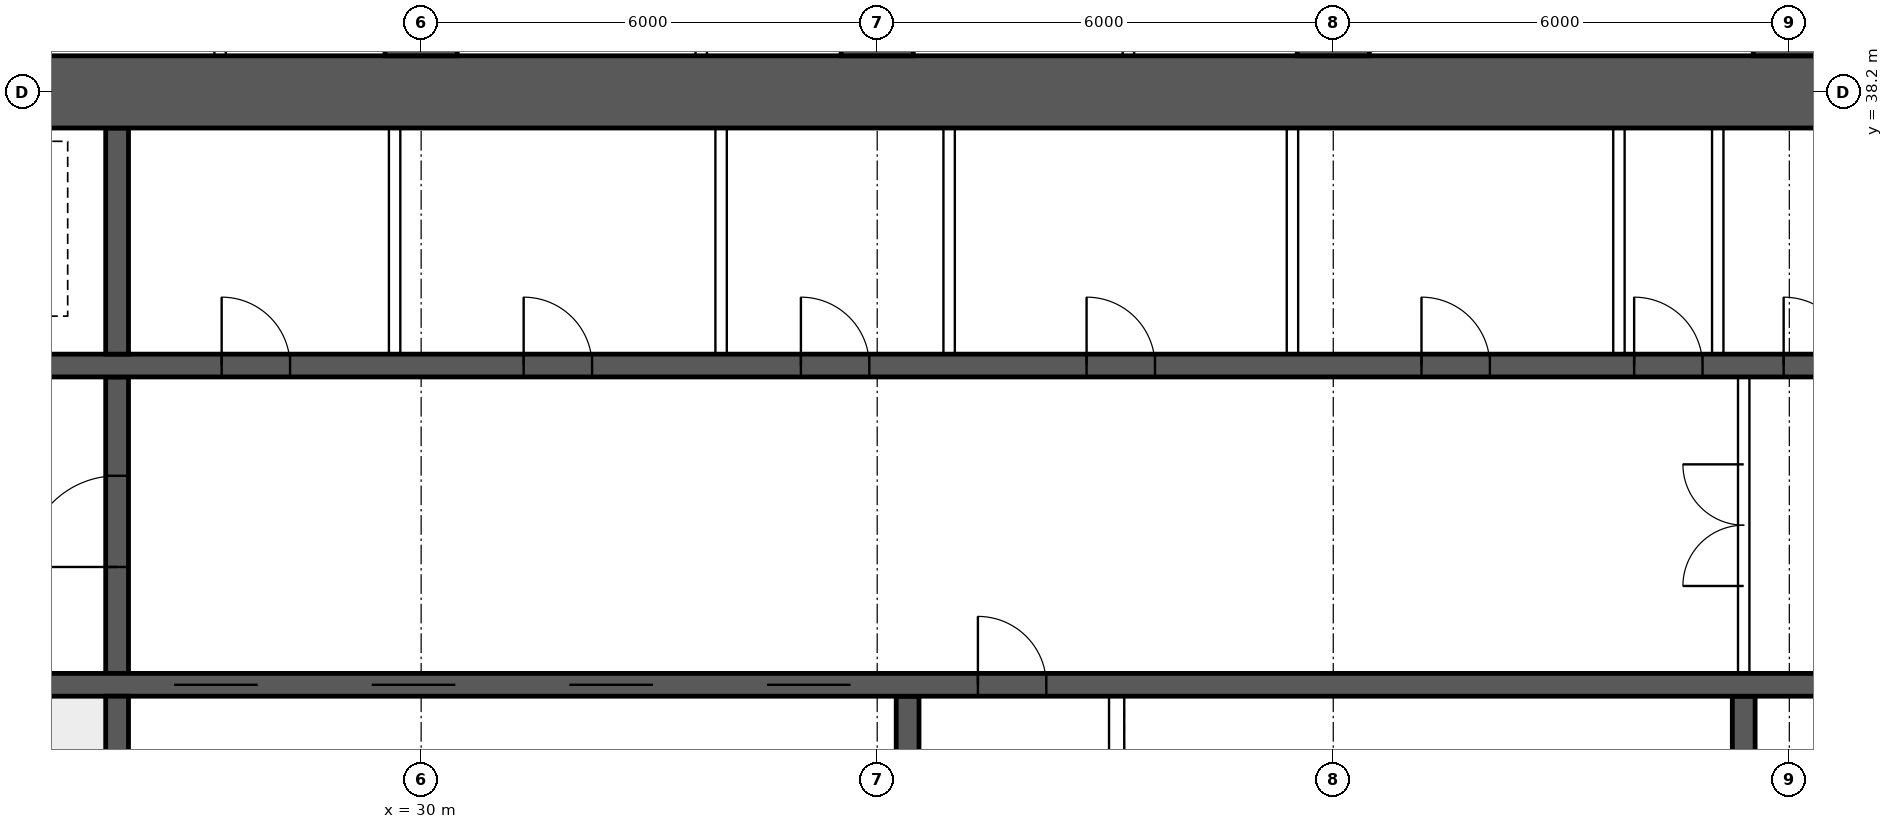
"""IFC4 building model, lengths in metres.
Left out: names, types, materials, properties, quantities, classifications, styles, units other than length and angle.
Written with IfcOpenShell. Run it as: python <this file> out.ifc"""

import sys

from ifc_helpers import new_model, si_unit, direction, frame, frame_2d, origin, place, context, subcontext, project, spatial, rectangle, extrude, element, fill, save


model = new_model("IFC4")
c1 = context("Model", 3, precision=1e-05, world=origin(), true_north=direction((0.0, 1.0)))
c2 = subcontext(c1, "Body", "Model", "MODEL_VIEW")
j1 = project(units=[si_unit("LENGTHUNIT", "METRE"), si_unit("PLANEANGLEUNIT", "RADIAN")], contexts=[c1])
p1 = place(None, origin())
s1 = spatial("IfcSite", under=j1, at=p1, CompositionType="ELEMENT")
p2 = place(p1, origin())
s2 = spatial("IfcBuilding", under=s1, at=p2, CompositionType="ELEMENT")
p3 = place(p2, frame((0.0, 0.0, 121.9)))
s3 = spatial("IfcBuildingStorey", under=s2, at=p3, CompositionType="ELEMENT", Elevation=121.9)
p4 = place(p3, frame((18.0, 38.2, 0.0), z_axis=(0.0, 0.0, 1.0), x_axis=(1.0, 0.0, 0.0)))
e1 = element("IfcWall", 1, at=p4, inside=s3, PredefinedType="SHEAR", context=c2, shape_type="SweptSolid", body=[
    extrude(rectangle(XDim=48.0, YDim=0.95, at=frame_2d((24.0, 0.0))), origin(), (0.0, 0.0, 1.0), 3.75),
])
p5 = place(p3, frame((18.475, 30.4, 0.0), z_axis=(0.0, 0.0, 1.0), x_axis=(1.0, 0.0, 0.0)))
e2 = element("IfcWall", 2, at=p5, inside=s3, PredefinedType="SHEAR", context=c2, shape_type="SweptSolid", body=[
    extrude(rectangle(XDim=47.05, YDim=0.3, at=frame_2d((23.525, 0.0))), origin(), (0.0, 0.0, 1.0), 3.75),
])
p6 = place(p5, frame((0.4, 0.0, 0.0)))
e3 = element("IfcOpeningElement", 3, at=p6, cuts=e2, PredefinedType="OPENING", context=c2, shape_type="SweptSolid", body=[
    extrude(rectangle(XDim=1.0, YDim=2.1, at=frame_2d((0.5, 1.05))), frame((0.0, 0.16, 0.0), z_axis=(0.0, -1.0, 0.0), x_axis=(1.0, 0.0, 0.0)), (0.0, 0.0, 1.0), 0.32),
])
p7 = place(p5, frame((45.65, 0.0, 0.0)))
e4 = element("IfcOpeningElement", 4, at=p7, cuts=e2, PredefinedType="OPENING", context=c2, shape_type="SweptSolid", body=[
    extrude(rectangle(XDim=1.0, YDim=2.1, at=frame_2d((0.5, 1.05))), frame((0.0, 0.16, 0.0), z_axis=(0.0, -1.0, 0.0), x_axis=(1.0, 0.0, 0.0)), (0.0, 0.0, 1.0), 0.32),
])
p8 = place(p5, frame((8.275, 0.0, 0.0)))
e5 = element("IfcOpeningElement", 5, at=p8, cuts=e2, PredefinedType="OPENING", context=c2, shape_type="SweptSolid", body=[
    extrude(rectangle(XDim=1.1, YDim=2.1, at=frame_2d((0.55, 1.05))), frame((0.0, 0.16, 0.0), z_axis=(0.0, -1.0, 0.0), x_axis=(1.0, 0.0, 0.0)), (0.0, 0.0, 1.0), 0.32),
])
p9 = place(p5, frame((10.875, 0.0, 0.0)))
e6 = element("IfcOpeningElement", 6, at=p9, cuts=e2, PredefinedType="OPENING", context=c2, shape_type="SweptSolid", body=[
    extrude(rectangle(XDim=1.1, YDim=2.1, at=frame_2d((0.55, 1.05))), frame((0.0, 0.16, 0.0), z_axis=(0.0, -1.0, 0.0), x_axis=(1.0, 0.0, 0.0)), (0.0, 0.0, 1.0), 0.32),
])
p10 = place(p5, frame((13.475, 0.0, 0.0)))
e7 = element("IfcOpeningElement", 7, at=p10, cuts=e2, PredefinedType="OPENING", context=c2, shape_type="SweptSolid", body=[
    extrude(rectangle(XDim=1.1, YDim=2.1, at=frame_2d((0.55, 1.05))), frame((0.0, 0.16, 0.0), z_axis=(0.0, -1.0, 0.0), x_axis=(1.0, 0.0, 0.0)), (0.0, 0.0, 1.0), 0.32),
])
p11 = place(p5, frame((16.075, 0.0, 0.0)))
e8 = element("IfcOpeningElement", 8, at=p11, cuts=e2, PredefinedType="OPENING", context=c2, shape_type="SweptSolid", body=[
    extrude(rectangle(XDim=1.1, YDim=2.1, at=frame_2d((0.55, 1.05))), frame((0.0, 0.16, 0.0), z_axis=(0.0, -1.0, 0.0), x_axis=(1.0, 0.0, 0.0)), (0.0, 0.0, 1.0), 0.32),
])
p12 = place(p5, frame((18.85, 0.0, 0.0)))
e9 = element("IfcOpeningElement", 9, at=p12, cuts=e2, PredefinedType="OPENING", context=c2, shape_type="SweptSolid", body=[
    extrude(rectangle(XDim=0.9, YDim=2.1, at=frame_2d((0.45, 1.05))), frame((0.0, 0.16, 0.0), z_axis=(0.0, -1.0, 0.0), x_axis=(1.0, 0.0, 0.0)), (0.0, 0.0, 1.0), 0.32),
])
p13 = place(p5, frame((30.142, 0.0, 0.0)))
e10 = element("IfcOpeningElement", 10, at=p13, cuts=e2, PredefinedType="OPENING", context=c2, shape_type="SweptSolid", body=[
    extrude(rectangle(XDim=1.1, YDim=2.1, at=frame_2d((0.55, 1.05))), frame((0.0, 0.16, 0.0), z_axis=(0.0, -1.0, 0.0), x_axis=(1.0, 0.0, 0.0)), (0.0, 0.0, 1.0), 0.32),
])
p14 = place(p5, frame((33.675, 0.0, 0.0)))
e11 = element("IfcOpeningElement", 11, at=p14, cuts=e2, PredefinedType="OPENING", context=c2, shape_type="SweptSolid", body=[
    extrude(rectangle(XDim=1.1, YDim=2.1, at=frame_2d((0.55, 1.05))), frame((0.0, 0.16, 0.0), z_axis=(0.0, -1.0, 0.0), x_axis=(1.0, 0.0, 0.0)), (0.0, 0.0, 1.0), 0.32),
])
p15 = place(p5, frame((37.208, 0.0, 0.0)))
e12 = element("IfcOpeningElement", 12, at=p15, cuts=e2, PredefinedType="OPENING", context=c2, shape_type="SweptSolid", body=[
    extrude(rectangle(XDim=1.1, YDim=2.1, at=frame_2d((0.55, 1.05))), frame((0.0, 0.16, 0.0), z_axis=(0.0, -1.0, 0.0), x_axis=(1.0, 0.0, 0.0)), (0.0, 0.0, 1.0), 0.32),
])
p16 = place(p3, frame((18.475, 34.6, 0.0), z_axis=(0.0, 0.0, 1.0), x_axis=(1.0, 0.0, 0.0)))
e13 = element("IfcWall", 13, at=p16, inside=s3, PredefinedType="SHEAR", context=c2, shape_type="SweptSolid", body=[
    extrude(rectangle(XDim=47.05, YDim=0.3, at=frame_2d((23.525, 0.0))), origin(), (0.0, 0.0, 1.0), 3.75),
])
p17 = place(p16, frame((0.9, 0.0, 0.0)))
e14 = element("IfcOpeningElement", 14, at=p17, cuts=e13, PredefinedType="OPENING", context=c2, shape_type="SweptSolid", body=[
    extrude(rectangle(XDim=1.1, YDim=2.1, at=frame_2d((0.55, 1.05))), frame((0.0, 0.16, 0.0), z_axis=(0.0, -1.0, 0.0), x_axis=(1.0, 0.0, 0.0)), (0.0, 0.0, 1.0), 0.32),
])
p18 = place(p16, frame((45.05, 0.0, 0.0)))
e15 = element("IfcOpeningElement", 15, at=p18, cuts=e13, PredefinedType="OPENING", context=c2, shape_type="SweptSolid", body=[
    extrude(rectangle(XDim=1.1, YDim=2.1, at=frame_2d((0.55, 1.05))), frame((0.0, 0.16, 0.0), z_axis=(0.0, -1.0, 0.0), x_axis=(1.0, 0.0, 0.0)), (0.0, 0.0, 1.0), 0.32),
])
p19 = place(p16, frame((4.125, 0.0, 0.0)))
e16 = element("IfcOpeningElement", 16, at=p19, cuts=e13, PredefinedType="OPENING", context=c2, shape_type="SweptSolid", body=[
    extrude(rectangle(XDim=0.9, YDim=2.1, at=frame_2d((0.45, 1.05))), frame((0.0, 0.16, 0.0), z_axis=(0.0, -1.0, 0.0), x_axis=(1.0, 0.0, 0.0)), (0.0, 0.0, 1.0), 0.32),
])
p20 = place(p16, frame((42.025, 0.0, 0.0)))
e17 = element("IfcOpeningElement", 17, at=p20, cuts=e13, PredefinedType="OPENING", context=c2, shape_type="SweptSolid", body=[
    extrude(rectangle(XDim=0.9, YDim=2.1, at=frame_2d((0.45, 1.05))), frame((0.0, 0.16, 0.0), z_axis=(0.0, -1.0, 0.0), x_axis=(1.0, 0.0, 0.0)), (0.0, 0.0, 1.0), 0.32),
])
p21 = place(p16, frame((8.9, 0.0, 0.0)))
e18 = element("IfcOpeningElement", 18, at=p21, cuts=e13, PredefinedType="OPENING", context=c2, shape_type="SweptSolid", body=[
    extrude(rectangle(XDim=0.9, YDim=2.1, at=frame_2d((0.45, 1.05))), frame((0.0, 0.16, 0.0), z_axis=(0.0, -1.0, 0.0), x_axis=(1.0, 0.0, 0.0)), (0.0, 0.0, 1.0), 0.32),
])
p22 = place(p16, frame((12.874, 0.0, 0.0)))
e19 = element("IfcOpeningElement", 19, at=p22, cuts=e13, PredefinedType="OPENING", context=c2, shape_type="SweptSolid", body=[
    extrude(rectangle(XDim=0.9, YDim=2.1, at=frame_2d((0.45, 1.05))), frame((0.0, 0.16, 0.0), z_axis=(0.0, -1.0, 0.0), x_axis=(1.0, 0.0, 0.0)), (0.0, 0.0, 1.0), 0.32),
])
p23 = place(p16, frame((16.521, 0.0, 0.0)))
e20 = element("IfcOpeningElement", 20, at=p23, cuts=e13, PredefinedType="OPENING", context=c2, shape_type="SweptSolid", body=[
    extrude(rectangle(XDim=0.9, YDim=2.1, at=frame_2d((0.45, 1.05))), frame((0.0, 0.16, 0.0), z_axis=(0.0, -1.0, 0.0), x_axis=(1.0, 0.0, 0.0)), (0.0, 0.0, 1.0), 0.32),
])
p24 = place(p16, frame((20.28, 0.0, 0.0)))
e21 = element("IfcOpeningElement", 21, at=p24, cuts=e13, PredefinedType="OPENING", context=c2, shape_type="SweptSolid", body=[
    extrude(rectangle(XDim=0.9, YDim=2.1, at=frame_2d((0.45, 1.05))), frame((0.0, 0.16, 0.0), z_axis=(0.0, -1.0, 0.0), x_axis=(1.0, 0.0, 0.0)), (0.0, 0.0, 1.0), 0.32),
])
p25 = place(p16, frame((24.686, 0.0, 0.0)))
e22 = element("IfcOpeningElement", 22, at=p25, cuts=e13, PredefinedType="OPENING", context=c2, shape_type="SweptSolid", body=[
    extrude(rectangle(XDim=0.9, YDim=2.1, at=frame_2d((0.45, 1.05))), frame((0.0, 0.16, 0.0), z_axis=(0.0, -1.0, 0.0), x_axis=(1.0, 0.0, 0.0)), (0.0, 0.0, 1.0), 0.32),
])
p26 = place(p16, frame((27.483, 0.0, 0.0)))
e23 = element("IfcOpeningElement", 23, at=p26, cuts=e13, PredefinedType="OPENING", context=c2, shape_type="SweptSolid", body=[
    extrude(rectangle(XDim=0.9, YDim=2.1, at=frame_2d((0.45, 1.05))), frame((0.0, 0.16, 0.0), z_axis=(0.0, -1.0, 0.0), x_axis=(1.0, 0.0, 0.0)), (0.0, 0.0, 1.0), 0.32),
])
p27 = place(p16, frame((29.45, 0.0, 0.0)))
e24 = element("IfcOpeningElement", 24, at=p27, cuts=e13, PredefinedType="OPENING", context=c2, shape_type="SweptSolid", body=[
    extrude(rectangle(XDim=0.9, YDim=2.1, at=frame_2d((0.45, 1.05))), frame((0.0, 0.16, 0.0), z_axis=(0.0, -1.0, 0.0), x_axis=(1.0, 0.0, 0.0)), (0.0, 0.0, 1.0), 0.32),
])
p28 = place(p16, frame((31.882, 0.0, 0.0)))
e25 = element("IfcOpeningElement", 25, at=p28, cuts=e13, PredefinedType="OPENING", context=c2, shape_type="SweptSolid", body=[
    extrude(rectangle(XDim=0.9, YDim=2.1, at=frame_2d((0.45, 1.05))), frame((0.0, 0.16, 0.0), z_axis=(0.0, -1.0, 0.0), x_axis=(1.0, 0.0, 0.0)), (0.0, 0.0, 1.0), 0.32),
])
p29 = place(p16, frame((34.617, 0.0, 0.0)))
e26 = element("IfcOpeningElement", 26, at=p29, cuts=e13, PredefinedType="OPENING", context=c2, shape_type="SweptSolid", body=[
    extrude(rectangle(XDim=0.9, YDim=2.1, at=frame_2d((0.45, 1.05))), frame((0.0, 0.16, 0.0), z_axis=(0.0, -1.0, 0.0), x_axis=(1.0, 0.0, 0.0)), (0.0, 0.0, 1.0), 0.32),
])
p30 = place(p16, frame((37.656, 0.0, 0.0)))
e27 = element("IfcOpeningElement", 27, at=p30, cuts=e13, PredefinedType="OPENING", context=c2, shape_type="SweptSolid", body=[
    extrude(rectangle(XDim=0.9, YDim=2.1, at=frame_2d((0.45, 1.05))), frame((0.0, 0.16, 0.0), z_axis=(0.0, -1.0, 0.0), x_axis=(1.0, 0.0, 0.0)), (0.0, 0.0, 1.0), 0.32),
])
p31 = place(p3, frame((26.0, 26.275, 0.0), z_axis=(0.0, 0.0, 1.0), x_axis=(0.0, 1.0, 0.0)))
e28 = element("IfcWall", 28, at=p31, inside=s3, PredefinedType="SHEAR", context=c2, shape_type="SweptSolid", body=[
    extrude(rectangle(XDim=3.975, YDim=0.3, at=frame_2d((1.988, 0.0))), origin(), (0.0, 0.0, 1.0), 3.75),
])
p32 = place(p3, frame((26.0, 30.55, 0.0), z_axis=(0.0, 0.0, 1.0), x_axis=(0.0, 1.0, 0.0)))
e29 = element("IfcWall", 29, at=p32, inside=s3, PredefinedType="SHEAR", context=c2, shape_type="SweptSolid", body=[
    extrude(rectangle(XDim=3.9, YDim=0.3, at=frame_2d((1.95, 0.0))), origin(), (0.0, 0.0, 1.0), 3.75),
])
p33 = place(p32, frame((1.4, 0.0, 0.0)))
e30 = element("IfcOpeningElement", 30, at=p33, cuts=e29, PredefinedType="OPENING", context=c2, shape_type="SweptSolid", body=[
    extrude(rectangle(XDim=1.2, YDim=2.1, at=frame_2d((0.6, 1.05))), frame((0.0, 0.16, 0.0), z_axis=(0.0, -1.0, 0.0), x_axis=(1.0, 0.0, 0.0)), (0.0, 0.0, 1.0), 0.32),
])
p34 = place(p3, frame((26.0, 34.75, 0.0), z_axis=(0.0, 0.0, 1.0), x_axis=(0.0, 1.0, 0.0)))
e31 = element("IfcWall", 31, at=p34, inside=s3, PredefinedType="SHEAR", context=c2, shape_type="SweptSolid", body=[
    extrude(rectangle(XDim=2.975, YDim=0.3, at=frame_2d((1.488, 0.0))), origin(), (0.0, 0.0, 1.0), 3.75),
])
for number, where, z_axis, x_axis in (
    (32, (36.4, 26.275, 0.0), (0.0, 0.0, 1.0), (0.0, 1.0, 0.0)),
    (33, (47.4, 26.275, 0.0), (0.0, 0.0, 1.0), (0.0, 1.0, 0.0)),
):
    element("IfcWall", number, at=place(p3, frame(where, z_axis=z_axis, x_axis=x_axis)), inside=s3, PredefinedType="SHEAR", context=c2, shape_type="SweptSolid", body=[
        extrude(rectangle(XDim=3.975, YDim=0.3, at=frame_2d((1.988, 0.0))), origin(), (0.0, 0.0, 1.0), 3.75),
    ])
for number, where, z_axis, x_axis in (
    (34, (30.0, 38.675, 0.0), (0.0, 0.0, 1.0), (0.0, 1.0, 0.0)),
    (35, (36.0, 38.675, 0.0), (0.0, 0.0, 1.0), (0.0, 1.0, 0.0)),
    (36, (42.0, 38.675, 0.0), (0.0, 0.0, 1.0), (0.0, 1.0, 0.0)),
    (37, (48.0, 38.675, 0.0), (0.0, 0.0, 1.0), (0.0, 1.0, 0.0)),
):
    element("IfcWall", number, at=place(p3, frame(where, z_axis=z_axis, x_axis=x_axis)), inside=s3, PredefinedType="SHEAR", context=c2, shape_type="SweptSolid", body=[
        extrude(rectangle(XDim=9.325, YDim=0.95, at=frame_2d((4.663, 0.0))), origin(), (0.0, 0.0, 1.0), 3.75),
    ])
p35 = place(p3, frame((47.4, 30.55, 0.0), z_axis=(0.0, 0.0, 1.0), x_axis=(0.0, 1.0, 0.0)))
e38 = element("IfcWall", 38, at=p35, inside=s3, PredefinedType="SOLIDWALL", context=c2, shape_type="SweptSolid", body=[
    extrude(rectangle(XDim=3.9, YDim=0.15, at=frame_2d((1.95, 0.0))), origin(), (0.0, 0.0, 1.0), 3.5),
])
p36 = place(p35, frame((1.15, 0.0, 0.0)))
e39 = element("IfcOpeningElement", 39, at=p36, cuts=e38, PredefinedType="OPENING", context=c2, shape_type="SweptSolid", body=[
    extrude(rectangle(XDim=1.6, YDim=2.1, at=frame_2d((0.8, 1.05))), frame((0.0, 0.085, 0.0), z_axis=(0.0, -1.0, 0.0), x_axis=(1.0, 0.0, 0.0)), (0.0, 0.0, 1.0), 0.17),
])
for number, where, z_axis, x_axis in (
    (40, (29.651, 34.75, 0.0), (0.0, 0.0, 1.0), (0.0, 1.0, 0.0)),
    (41, (33.946, 34.75, 0.0), (0.0, 0.0, 1.0), (0.0, 1.0, 0.0)),
    (42, (36.946, 34.75, 0.0), (0.0, 0.0, 1.0), (0.0, 1.0, 0.0)),
    (43, (41.463, 34.75, 0.0), (0.0, 0.0, 1.0), (0.0, 1.0, 0.0)),
    (44, (45.758, 34.75, 0.0), (0.0, 0.0, 1.0), (0.0, 1.0, 0.0)),
    (45, (47.058, 34.75, 0.0), (0.0, 0.0, 1.0), (0.0, 1.0, 0.0)),
):
    element("IfcWall", number, at=place(p3, frame(where, z_axis=z_axis, x_axis=x_axis)), inside=s3, PredefinedType="SOLIDWALL", context=c2, shape_type="SweptSolid", body=[
        extrude(rectangle(XDim=2.975, YDim=0.15, at=frame_2d((1.488, 0.0))), origin(), (0.0, 0.0, 1.0), 3.5),
    ])
p37 = place(p3, frame((39.15, 26.275, 0.0), z_axis=(0.0, 0.0, 1.0), x_axis=(0.0, 1.0, 0.0)))
e46 = element("IfcWall", 46, at=p37, inside=s3, PredefinedType="SOLIDWALL", context=c2, shape_type="SweptSolid", body=[
    extrude(rectangle(XDim=3.975, YDim=0.2, at=frame_2d((1.988, 0.0))), origin(), (0.0, 0.0, 1.0), 3.5),
])
for number, where, z_axis, x_axis in (
    (47, (27.355, 38.675, 0.0), (0.0, 0.0, 1.0), (0.0, 1.0, 0.0)),
    (48, (33.685, 38.675, 0.0), (0.0, 0.0, 1.0), (0.0, 1.0, 0.0)),
    (49, (39.305, 38.675, 0.0), (0.0, 0.0, 1.0), (0.0, 1.0, 0.0)),
):
    element("IfcWall", number, at=place(p3, frame(where, z_axis=z_axis, x_axis=x_axis)), inside=s3, PredefinedType="PARTITIONING", context=c2, shape_type="SweptSolid", body=[
        extrude(rectangle(XDim=9.225, YDim=0.15, at=frame_2d((4.612, 0.0))), origin(), (0.0, 0.0, 1.0), 3.5),
    ])
p38 = place(p36, origin())
e50 = element("IfcDoor", 50, at=p38, inside=s3, OperationType="DOUBLE_DOOR_SINGLE_SWING", PredefinedType="DOOR", context=c2, shape_type="SweptSolid", body=[
    extrude(rectangle(XDim=1.6, YDim=2.1, at=frame_2d((0.8, 1.05))), frame((0.0, 0.025, 0.0), z_axis=(0.0, -1.0, 0.0), x_axis=(1.0, 0.0, 0.0)), (0.0, 0.0, 1.0), 0.05),
])
fill(e39, e50)
p39 = place(p33, origin())
e51 = element("IfcDoor", 51, at=p39, inside=s3, OperationType="SINGLE_SWING_LEFT", PredefinedType="DOOR", context=c2, shape_type="SweptSolid", body=[
    extrude(rectangle(XDim=1.2, YDim=2.1, at=frame_2d((0.6, 1.05))), frame((0.0, 0.025, 0.0), z_axis=(0.0, -1.0, 0.0), x_axis=(1.0, 0.0, 0.0)), (0.0, 0.0, 1.0), 0.05),
])
fill(e30, e51)
p40 = place(p21, origin())
e52 = element("IfcDoor", 52, at=p40, inside=s3, OperationType="SINGLE_SWING_LEFT", PredefinedType="DOOR", context=c2, shape_type="SweptSolid", body=[
    extrude(rectangle(XDim=0.9, YDim=2.1, at=frame_2d((0.45, 1.05))), frame((0.0, 0.025, 0.0), z_axis=(0.0, -1.0, 0.0), x_axis=(1.0, 0.0, 0.0)), (0.0, 0.0, 1.0), 0.05),
])
fill(e18, e52)
p41 = place(p22, origin())
e53 = element("IfcDoor", 53, at=p41, inside=s3, OperationType="SINGLE_SWING_LEFT", PredefinedType="DOOR", context=c2, shape_type="SweptSolid", body=[
    extrude(rectangle(XDim=0.9, YDim=2.1, at=frame_2d((0.45, 1.05))), frame((0.0, 0.025, 0.0), z_axis=(0.0, -1.0, 0.0), x_axis=(1.0, 0.0, 0.0)), (0.0, 0.0, 1.0), 0.05),
])
fill(e19, e53)
p42 = place(p23, origin())
e54 = element("IfcDoor", 54, at=p42, inside=s3, OperationType="SINGLE_SWING_LEFT", PredefinedType="DOOR", context=c2, shape_type="SweptSolid", body=[
    extrude(rectangle(XDim=0.9, YDim=2.1, at=frame_2d((0.45, 1.05))), frame((0.0, 0.025, 0.0), z_axis=(0.0, -1.0, 0.0), x_axis=(1.0, 0.0, 0.0)), (0.0, 0.0, 1.0), 0.05),
])
fill(e20, e54)
p43 = place(p24, origin())
e55 = element("IfcDoor", 55, at=p43, inside=s3, OperationType="SINGLE_SWING_LEFT", PredefinedType="DOOR", context=c2, shape_type="SweptSolid", body=[
    extrude(rectangle(XDim=0.9, YDim=2.1, at=frame_2d((0.45, 1.05))), frame((0.0, 0.025, 0.0), z_axis=(0.0, -1.0, 0.0), x_axis=(1.0, 0.0, 0.0)), (0.0, 0.0, 1.0), 0.05),
])
fill(e21, e55)
p44 = place(p25, origin())
e56 = element("IfcDoor", 56, at=p44, inside=s3, OperationType="SINGLE_SWING_LEFT", PredefinedType="DOOR", context=c2, shape_type="SweptSolid", body=[
    extrude(rectangle(XDim=0.9, YDim=2.1, at=frame_2d((0.45, 1.05))), frame((0.0, 0.025, 0.0), z_axis=(0.0, -1.0, 0.0), x_axis=(1.0, 0.0, 0.0)), (0.0, 0.0, 1.0), 0.05),
])
fill(e22, e56)
p45 = place(p26, origin())
e57 = element("IfcDoor", 57, at=p45, inside=s3, OperationType="SINGLE_SWING_LEFT", PredefinedType="DOOR", context=c2, shape_type="SweptSolid", body=[
    extrude(rectangle(XDim=0.9, YDim=2.1, at=frame_2d((0.45, 1.05))), frame((0.0, 0.025, 0.0), z_axis=(0.0, -1.0, 0.0), x_axis=(1.0, 0.0, 0.0)), (0.0, 0.0, 1.0), 0.05),
])
fill(e23, e57)
p46 = place(p27, origin())
e58 = element("IfcDoor", 58, at=p46, inside=s3, OperationType="SINGLE_SWING_LEFT", PredefinedType="DOOR", context=c2, shape_type="SweptSolid", body=[
    extrude(rectangle(XDim=0.9, YDim=2.1, at=frame_2d((0.45, 1.05))), frame((0.0, 0.025, 0.0), z_axis=(0.0, -1.0, 0.0), x_axis=(1.0, 0.0, 0.0)), (0.0, 0.0, 1.0), 0.05),
])
fill(e24, e58)
p47 = place(p8, origin())
e59 = element("IfcDoor", 59, at=p47, inside=s3, OperationType="DOUBLE_DOOR_SLIDING", PredefinedType="DOOR", context=c2, shape_type="SweptSolid", body=[
    extrude(rectangle(XDim=1.1, YDim=2.1, at=frame_2d((0.55, 1.05))), frame((0.0, 0.025, 0.0), z_axis=(0.0, -1.0, 0.0), x_axis=(1.0, 0.0, 0.0)), (0.0, 0.0, 1.0), 0.05),
])
fill(e5, e59)
p48 = place(p9, origin())
e60 = element("IfcDoor", 60, at=p48, inside=s3, OperationType="DOUBLE_DOOR_SLIDING", PredefinedType="DOOR", context=c2, shape_type="SweptSolid", body=[
    extrude(rectangle(XDim=1.1, YDim=2.1, at=frame_2d((0.55, 1.05))), frame((0.0, 0.025, 0.0), z_axis=(0.0, -1.0, 0.0), x_axis=(1.0, 0.0, 0.0)), (0.0, 0.0, 1.0), 0.05),
])
fill(e6, e60)
p49 = place(p10, origin())
e61 = element("IfcDoor", 61, at=p49, inside=s3, OperationType="DOUBLE_DOOR_SLIDING", PredefinedType="DOOR", context=c2, shape_type="SweptSolid", body=[
    extrude(rectangle(XDim=1.1, YDim=2.1, at=frame_2d((0.55, 1.05))), frame((0.0, 0.025, 0.0), z_axis=(0.0, -1.0, 0.0), x_axis=(1.0, 0.0, 0.0)), (0.0, 0.0, 1.0), 0.05),
])
fill(e7, e61)
p50 = place(p11, origin())
e62 = element("IfcDoor", 62, at=p50, inside=s3, OperationType="DOUBLE_DOOR_SLIDING", PredefinedType="DOOR", context=c2, shape_type="SweptSolid", body=[
    extrude(rectangle(XDim=1.1, YDim=2.1, at=frame_2d((0.55, 1.05))), frame((0.0, 0.025, 0.0), z_axis=(0.0, -1.0, 0.0), x_axis=(1.0, 0.0, 0.0)), (0.0, 0.0, 1.0), 0.05),
])
fill(e8, e62)
p51 = place(p12, origin())
e63 = element("IfcDoor", 63, at=p51, inside=s3, OperationType="SINGLE_SWING_LEFT", PredefinedType="DOOR", context=c2, shape_type="SweptSolid", body=[
    extrude(rectangle(XDim=0.9, YDim=2.1, at=frame_2d((0.45, 1.05))), frame((0.0, 0.025, 0.0), z_axis=(0.0, -1.0, 0.0), x_axis=(1.0, 0.0, 0.0)), (0.0, 0.0, 1.0), 0.05),
])
fill(e9, e63)
save(model, sys.argv[1])
